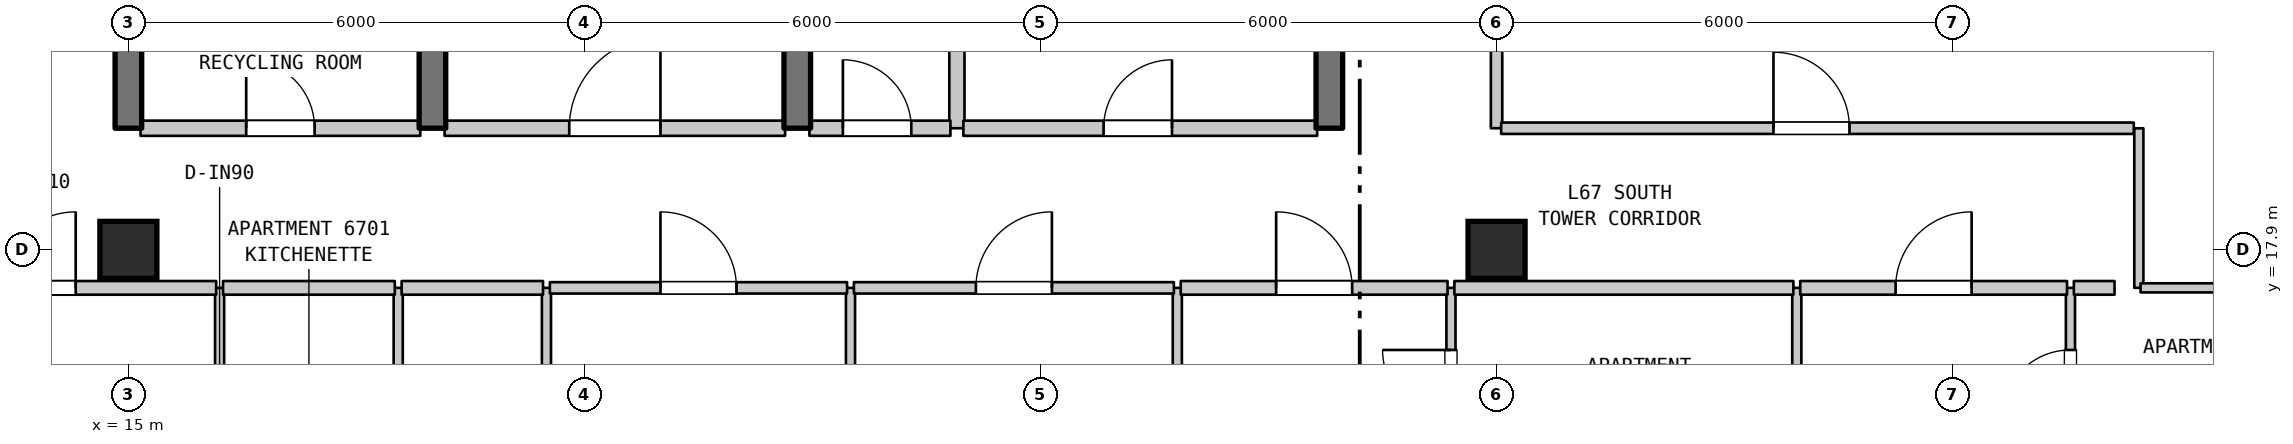
"""IFC4 building model, lengths in metres.
Left out: names, types, materials, properties, quantities, classifications, styles, units other than length and angle.
Written with IfcOpenShell. Run it as: python <this file> out.ifc"""

import sys

from ifc_helpers import new_model, si_unit, direction, frame, frame_2d, origin, origin_2d, place, context, subcontext, project, spatial, rectangle, extrude, element, fill, save


model = new_model("IFC4")
c1 = context("Model", 3, precision=1e-05, world=origin(), true_north=direction((0.0, 1.0)))
c2 = subcontext(c1, "Body", "Model", "MODEL_VIEW")
j1 = project(units=[si_unit("LENGTHUNIT", "METRE"), si_unit("PLANEANGLEUNIT", "RADIAN")], contexts=[c1])
p1 = place(None, origin())
s1 = spatial("IfcSite", under=j1, at=p1, CompositionType="ELEMENT")
p2 = place(p1, origin())
s2 = spatial("IfcBuilding", under=s1, at=p2, CompositionType="ELEMENT")
p3 = place(p2, frame((0.0, 0.0, 269.5)))
s3 = spatial("IfcBuildingStorey", under=s2, at=p3, CompositionType="ELEMENT", Elevation=269.5)
for number, where, z_axis, x_axis in (
    (1, (15.0, 17.9, 0.0), (0.0, 0.0, 1.0), (1.0, 0.0, 0.0)),
    (2, (33.0, 17.9, 0.0), (0.0, 0.0, 1.0), (1.0, 0.0, 0.0)),
):
    element("IfcColumn", number, at=place(p3, frame(where, z_axis=z_axis, x_axis=x_axis)), inside=s3, PredefinedType="COLUMN", context=c2, shape_type="SweptSolid", body=[
        extrude(rectangle(XDim=0.75, YDim=0.75, at=origin_2d()), origin(), (0.0, 0.0, 1.0), 3.7),
    ])
p4 = place(p3, frame((15.0, 19.5, 0.0), z_axis=(0.0, 0.0, 1.0), x_axis=(0.0, 1.0, 0.0)))
e3 = element("IfcWall", 3, at=p4, inside=s3, PredefinedType="SHEAR", context=c2, shape_type="SweptSolid", body=[
    extrude(rectangle(XDim=3.2, YDim=0.35, at=frame_2d((1.6, 0.0))), origin(), (0.0, 0.0, 1.0), 3.39),
])
p5 = place(p3, frame((16.2, 14.2, 0.0), z_axis=(0.0, 0.0, 1.0), x_axis=(0.0, 1.0, 0.0)))
e4 = element("IfcWall", 4, at=p5, inside=s3, PredefinedType="PARTITIONING", context=c2, shape_type="SweptSolid", body=[
    extrude(rectangle(XDim=3.2, YDim=0.12, at=frame_2d((1.6, 0.0))), origin(), (0.0, 0.0, 1.0), 3.39),
])
p6 = place(p5, frame((1.15, 0.0, 0.0)))
e5 = element("IfcOpeningElement", 5, at=p6, cuts=e4, PredefinedType="OPENING", context=c2, shape_type="SweptSolid", body=[
    extrude(rectangle(XDim=0.9, YDim=2.15, at=frame_2d((0.45, 1.075))), frame((0.0, 0.07, 0.0), z_axis=(0.0, -1.0, 0.0), x_axis=(1.0, 0.0, 0.0)), (0.0, 0.0, 1.0), 0.14),
])
p7 = place(p3, frame((18.55, 14.2, 0.0), z_axis=(0.0, 0.0, 1.0), x_axis=(0.0, 1.0, 0.0)))
e6 = element("IfcWall", 6, at=p7, inside=s3, PredefinedType="PARTITIONING", context=c2, shape_type="SweptSolid", body=[
    extrude(rectangle(XDim=3.2, YDim=0.12, at=frame_2d((1.6, 0.0))), origin(), (0.0, 0.0, 1.0), 3.39),
])
p8 = place(p3, frame((19.0, 19.5, 0.0), z_axis=(0.0, 0.0, 1.0), x_axis=(0.0, 1.0, 0.0)))
e7 = element("IfcWall", 7, at=p8, inside=s3, PredefinedType="SHEAR", context=c2, shape_type="SweptSolid", body=[
    extrude(rectangle(XDim=3.2, YDim=0.35, at=frame_2d((1.6, 0.0))), origin(), (0.0, 0.0, 1.0), 3.39),
])
p9 = place(p3, frame((20.5, 7.189, 0.0), z_axis=(0.0, 0.0, 1.0), x_axis=(0.0, 1.0, 0.0)))
e8 = element("IfcWall", 8, at=p9, inside=s3, PredefinedType="PARTITIONING", context=c2, shape_type="SweptSolid", body=[
    extrude(rectangle(XDim=10.211, YDim=0.12, at=frame_2d((5.105, 0.0))), origin(), (0.0, 0.0, 1.0), 3.39),
])
p10 = place(p3, frame((23.8, 19.5, 0.0), z_axis=(0.0, 0.0, 1.0), x_axis=(0.0, 1.0, 0.0)))
e9 = element("IfcWall", 9, at=p10, inside=s3, PredefinedType="SHEAR", context=c2, shape_type="SweptSolid", body=[
    extrude(rectangle(XDim=6.6, YDim=0.35, at=frame_2d((3.3, 0.0))), origin(), (0.0, 0.0, 1.0), 3.39),
])
p11 = place(p10, frame((4.304, 0.0, 0.0)))
e10 = element("IfcOpeningElement", 10, at=p11, cuts=e9, PredefinedType="OPENING", context=c2, shape_type="SweptSolid", body=[
    extrude(rectangle(XDim=0.9, YDim=2.15, at=frame_2d((0.45, 1.075))), frame((0.0, 0.185, 0.0), z_axis=(0.0, -1.0, 0.0), x_axis=(1.0, 0.0, 0.0)), (0.0, 0.0, 1.0), 0.37),
])
p12 = place(p3, frame((24.5, 6.71, 0.0), z_axis=(0.0, 0.0, 1.0), x_axis=(0.0, 1.0, 0.0)))
e11 = element("IfcWall", 11, at=p12, inside=s3, PredefinedType="PARTITIONING", context=c2, shape_type="SweptSolid", body=[
    extrude(rectangle(XDim=10.69, YDim=0.12, at=frame_2d((5.345, 0.0))), origin(), (0.0, 0.0, 1.0), 3.39),
])
p13 = place(p3, frame((25.9, 19.5, 0.0), z_axis=(0.0, 0.0, 1.0), x_axis=(0.0, 1.0, 0.0)))
e12 = element("IfcWall", 12, at=p13, inside=s3, PredefinedType="STANDARD", context=c2, shape_type="SweptSolid", body=[
    extrude(rectangle(XDim=3.2, YDim=0.2, at=frame_2d((1.6, 0.0))), origin(), (0.0, 0.0, 1.0), 3.39),
])
p14 = place(p3, frame((28.8, 6.71, 0.0), z_axis=(0.0, 0.0, 1.0), x_axis=(0.0, 1.0, 0.0)))
e13 = element("IfcWall", 13, at=p14, inside=s3, PredefinedType="PARTITIONING", context=c2, shape_type="SweptSolid", body=[
    extrude(rectangle(XDim=10.69, YDim=0.12, at=frame_2d((5.345, 0.0))), origin(), (0.0, 0.0, 1.0), 3.39),
])
p15 = place(p3, frame((30.8, 19.5, 0.0), z_axis=(0.0, 0.0, 1.0), x_axis=(0.0, 1.0, 0.0)))
e14 = element("IfcWall", 14, at=p15, inside=s3, PredefinedType="SHEAR", context=c2, shape_type="SweptSolid", body=[
    extrude(rectangle(XDim=3.2, YDim=0.35, at=frame_2d((1.6, 0.0))), origin(), (0.0, 0.0, 1.0), 3.39),
])
p16 = place(p3, frame((32.4, 15.008, 0.0), z_axis=(0.0, 0.0, 1.0), x_axis=(0.0, 1.0, 0.0)))
e15 = element("IfcWall", 15, at=p16, inside=s3, PredefinedType="PARTITIONING", context=c2, shape_type="SweptSolid", body=[
    extrude(rectangle(XDim=2.392, YDim=0.12, at=frame_2d((1.196, 0.0))), origin(), (0.0, 0.0, 1.0), 3.39),
])
p17 = place(p16, frame((0.675, 0.0, 0.0)))
e16 = element("IfcOpeningElement", 16, at=p17, cuts=e15, PredefinedType="OPENING", context=c2, shape_type="SweptSolid", body=[
    extrude(rectangle(XDim=0.9, YDim=2.1, at=frame_2d((0.45, 1.05))), frame((0.0, 0.07, 0.0), z_axis=(0.0, -1.0, 0.0), x_axis=(1.0, 0.0, 0.0)), (0.0, 0.0, 1.0), 0.14),
])
p18 = place(p3, frame((33.0, 19.5, 0.0), z_axis=(0.0, 0.0, 1.0), x_axis=(0.0, 1.0, 0.0)))
e17 = element("IfcWall", 17, at=p18, inside=s3, PredefinedType="STANDARD", context=c2, shape_type="SweptSolid", body=[
    extrude(rectangle(XDim=8.4, YDim=0.15, at=frame_2d((4.2, 0.0))), origin(), (0.0, 0.0, 1.0), 3.1),
])
p19 = place(p18, frame((5.18, 0.0, 0.0)))
e18 = element("IfcOpeningElement", 18, at=p19, cuts=e17, PredefinedType="OPENING", context=c2, shape_type="SweptSolid", body=[
    extrude(rectangle(XDim=1.0, YDim=2.15, at=frame_2d((0.5, 1.075))), frame((0.0, 0.085, 0.0), z_axis=(0.0, -1.0, 0.0), x_axis=(1.0, 0.0, 0.0)), (0.0, 0.0, 1.0), 0.17),
])
p20 = place(p3, frame((36.95, 15.008, 0.0), z_axis=(0.0, 0.0, 1.0), x_axis=(0.0, 1.0, 0.0)))
e19 = element("IfcWall", 19, at=p20, inside=s3, PredefinedType="PARTITIONING", context=c2, shape_type="SweptSolid", body=[
    extrude(rectangle(XDim=2.392, YDim=0.12, at=frame_2d((1.196, 0.0))), origin(), (0.0, 0.0, 1.0), 3.39),
])
p21 = place(p3, frame((40.55, 15.008, 0.0), z_axis=(0.0, 0.0, 1.0), x_axis=(0.0, 1.0, 0.0)))
e20 = element("IfcWall", 20, at=p21, inside=s3, PredefinedType="PARTITIONING", context=c2, shape_type="SweptSolid", body=[
    extrude(rectangle(XDim=2.392, YDim=0.12, at=frame_2d((1.196, 0.0))), origin(), (0.0, 0.0, 1.0), 3.39),
])
p22 = place(p21, frame((0.675, 0.0, 0.0)))
e21 = element("IfcOpeningElement", 21, at=p22, cuts=e20, PredefinedType="OPENING", context=c2, shape_type="SweptSolid", body=[
    extrude(rectangle(XDim=0.9, YDim=2.1, at=frame_2d((0.45, 1.05))), frame((0.0, 0.07, 0.0), z_axis=(0.0, -1.0, 0.0), x_axis=(1.0, 0.0, 0.0)), (0.0, 0.0, 1.0), 0.14),
])
p23 = place(p3, frame((41.45, 17.4, 0.0), z_axis=(0.0, 0.0, 1.0), x_axis=(0.0, 1.0, 0.0)))
e22 = element("IfcWall", 22, at=p23, inside=s3, PredefinedType="PARTITIONING", context=c2, shape_type="SweptSolid", body=[
    extrude(rectangle(XDim=2.099, YDim=0.12, at=frame_2d((1.05, 0.0))), origin(), (0.0, 0.0, 1.0), 3.39),
])
p24 = place(p3, frame((12.975, 17.4, 0.0), z_axis=(0.0, 0.0, 1.0), x_axis=(1.0, 0.0, 0.0)))
e23 = element("IfcWall", 23, at=p24, inside=s3, PredefinedType="STANDARD", context=c2, shape_type="SweptSolid", body=[
    extrude(rectangle(XDim=3.18, YDim=0.18, at=frame_2d((1.59, 0.0))), origin(), (0.0, 0.0, 1.0), 3.39),
])
p25 = place(p24, frame((0.332, 0.0, 0.0)))
e24 = element("IfcOpeningElement", 24, at=p25, cuts=e23, PredefinedType="OPENING", context=c2, shape_type="SweptSolid", body=[
    extrude(rectangle(XDim=1.0, YDim=2.15, at=frame_2d((0.5, 1.075))), frame((0.0, 0.1, 0.0), z_axis=(0.0, -1.0, 0.0), x_axis=(1.0, 0.0, 0.0)), (0.0, 0.0, 1.0), 0.2),
])
p26 = place(p3, frame((16.245, 17.4, 0.0), z_axis=(0.0, 0.0, 1.0), x_axis=(1.0, 0.0, 0.0)))
e25 = element("IfcWall", 25, at=p26, inside=s3, PredefinedType="STANDARD", context=c2, shape_type="SweptSolid", body=[
    extrude(rectangle(XDim=2.26, YDim=0.18, at=frame_2d((1.13, 0.0))), origin(), (0.0, 0.0, 1.0), 3.39),
])
p27 = place(p3, frame((18.595, 17.4, 0.0), z_axis=(0.0, 0.0, 1.0), x_axis=(1.0, 0.0, 0.0)))
e26 = element("IfcWall", 26, at=p27, inside=s3, PredefinedType="STANDARD", context=c2, shape_type="SweptSolid", body=[
    extrude(rectangle(XDim=1.86, YDim=0.18, at=frame_2d((0.93, 0.0))), origin(), (0.0, 0.0, 1.0), 3.39),
])
p28 = place(p3, frame((20.545, 17.4, 0.0), z_axis=(0.0, 0.0, 1.0), x_axis=(1.0, 0.0, 0.0)))
e27 = element("IfcWall", 27, at=p28, inside=s3, PredefinedType="STANDARD", context=c2, shape_type="SweptSolid", body=[
    extrude(rectangle(XDim=3.91, YDim=0.15, at=frame_2d((1.955, 0.0))), origin(), (0.0, 0.0, 1.0), 3.39),
])
p29 = place(p28, frame((1.455, 0.0, 0.0)))
e28 = element("IfcOpeningElement", 28, at=p29, cuts=e27, PredefinedType="OPENING", context=c2, shape_type="SweptSolid", body=[
    extrude(rectangle(XDim=1.0, YDim=2.15, at=frame_2d((0.5, 1.075))), frame((0.0, 0.085, 0.0), z_axis=(0.0, -1.0, 0.0), x_axis=(1.0, 0.0, 0.0)), (0.0, 0.0, 1.0), 0.17),
])
p30 = place(p3, frame((24.545, 17.4, 0.0), z_axis=(0.0, 0.0, 1.0), x_axis=(1.0, 0.0, 0.0)))
e29 = element("IfcWall", 29, at=p30, inside=s3, PredefinedType="STANDARD", context=c2, shape_type="SweptSolid", body=[
    extrude(rectangle(XDim=4.21, YDim=0.15, at=frame_2d((2.105, 0.0))), origin(), (0.0, 0.0, 1.0), 3.39),
])
p31 = place(p30, frame((1.605, 0.0, 0.0)))
e30 = element("IfcOpeningElement", 30, at=p31, cuts=e29, PredefinedType="OPENING", context=c2, shape_type="SweptSolid", body=[
    extrude(rectangle(XDim=1.0, YDim=2.15, at=frame_2d((0.5, 1.075))), frame((0.0, 0.085, 0.0), z_axis=(0.0, -1.0, 0.0), x_axis=(1.0, 0.0, 0.0)), (0.0, 0.0, 1.0), 0.17),
])
p32 = place(p3, frame((28.845, 17.4, 0.0), z_axis=(0.0, 0.0, 1.0), x_axis=(1.0, 0.0, 0.0)))
e31 = element("IfcWall", 31, at=p32, inside=s3, PredefinedType="STANDARD", context=c2, shape_type="SweptSolid", body=[
    extrude(rectangle(XDim=3.51, YDim=0.18, at=frame_2d((1.755, 0.0))), origin(), (0.0, 0.0, 1.0), 3.39),
])
p33 = place(p32, frame((1.255, 0.0, 0.0)))
e32 = element("IfcOpeningElement", 32, at=p33, cuts=e31, PredefinedType="OPENING", context=c2, shape_type="SweptSolid", body=[
    extrude(rectangle(XDim=1.0, YDim=2.15, at=frame_2d((0.5, 1.075))), frame((0.0, 0.1, 0.0), z_axis=(0.0, -1.0, 0.0), x_axis=(1.0, 0.0, 0.0)), (0.0, 0.0, 1.0), 0.2),
])
p34 = place(p3, frame((32.445, 17.4, 0.0), z_axis=(0.0, 0.0, 1.0), x_axis=(1.0, 0.0, 0.0)))
e33 = element("IfcWall", 33, at=p34, inside=s3, PredefinedType="STANDARD", context=c2, shape_type="SweptSolid", body=[
    extrude(rectangle(XDim=4.46, YDim=0.18, at=frame_2d((2.23, 0.0))), origin(), (0.0, 0.0, 1.0), 3.39),
])
p35 = place(p3, frame((36.995, 17.4, 0.0), z_axis=(0.0, 0.0, 1.0), x_axis=(1.0, 0.0, 0.0)))
e34 = element("IfcWall", 34, at=p35, inside=s3, PredefinedType="STANDARD", context=c2, shape_type="SweptSolid", body=[
    extrude(rectangle(XDim=3.51, YDim=0.18, at=frame_2d((1.755, 0.0))), origin(), (0.0, 0.0, 1.0), 3.39),
])
p36 = place(p35, frame((1.255, 0.0, 0.0)))
e35 = element("IfcOpeningElement", 35, at=p36, cuts=e34, PredefinedType="OPENING", context=c2, shape_type="SweptSolid", body=[
    extrude(rectangle(XDim=1.0, YDim=2.15, at=frame_2d((0.5, 1.075))), frame((0.0, 0.1, 0.0), z_axis=(0.0, -1.0, 0.0), x_axis=(1.0, 0.0, 0.0)), (0.0, 0.0, 1.0), 0.2),
])
p37 = place(p3, frame((40.595, 17.4, 0.0), z_axis=(0.0, 0.0, 1.0), x_axis=(1.0, 0.0, 0.0)))
e36 = element("IfcWall", 36, at=p37, inside=s3, PredefinedType="STANDARD", context=c2, shape_type="SweptSolid", body=[
    extrude(rectangle(XDim=0.535, YDim=0.18, at=frame_2d((0.268, 0.0))), origin(), (0.0, 0.0, 1.0), 3.39),
])
p38 = place(p3, frame((41.473, 17.4, 0.0), z_axis=(0.0, 0.0, 1.0), x_axis=(1.0, 0.0, 0.0)))
e37 = element("IfcWall", 37, at=p38, inside=s3, PredefinedType="PARTITIONING", context=c2, shape_type="SweptSolid", body=[
    extrude(rectangle(XDim=2.031, YDim=0.12, at=frame_2d((1.016, 0.0))), origin(), (0.0, 0.0, 1.0), 3.39),
])
p39 = place(p3, frame((15.16, 19.5, 0.0), z_axis=(0.0, 0.0, 1.0), x_axis=(1.0, 0.0, 0.0)))
e38 = element("IfcWall", 38, at=p39, inside=s3, PredefinedType="STANDARD", context=c2, shape_type="SweptSolid", body=[
    extrude(rectangle(XDim=3.68, YDim=0.2, at=frame_2d((1.84, 0.0))), origin(), (0.0, 0.0, 1.0), 3.39),
])
p40 = place(p39, frame((1.39, 0.0, 0.0)))
e39 = element("IfcOpeningElement", 39, at=p40, cuts=e38, PredefinedType="OPENING", context=c2, shape_type="SweptSolid", body=[
    extrude(rectangle(XDim=0.9, YDim=2.15, at=frame_2d((0.45, 1.075))), frame((0.0, 0.11, 0.0), z_axis=(0.0, -1.0, 0.0), x_axis=(1.0, 0.0, 0.0)), (0.0, 0.0, 1.0), 0.22),
])
p41 = place(p3, frame((19.16, 19.5, 0.0), z_axis=(0.0, 0.0, 1.0), x_axis=(1.0, 0.0, 0.0)))
e40 = element("IfcWall", 40, at=p41, inside=s3, PredefinedType="STANDARD", context=c2, shape_type="SweptSolid", body=[
    extrude(rectangle(XDim=4.48, YDim=0.2, at=frame_2d((2.24, 0.0))), origin(), (0.0, 0.0, 1.0), 3.39),
])
p42 = place(p41, frame((1.64, 0.0, 0.0)))
e41 = element("IfcOpeningElement", 41, at=p42, cuts=e40, PredefinedType="OPENING", context=c2, shape_type="SweptSolid", body=[
    extrude(rectangle(XDim=1.2, YDim=2.2, at=frame_2d((0.6, 1.1))), frame((0.0, 0.11, 0.0), z_axis=(0.0, -1.0, 0.0), x_axis=(1.0, 0.0, 0.0)), (0.0, 0.0, 1.0), 0.22),
])
p43 = place(p3, frame((23.96, 19.5, 0.0), z_axis=(0.0, 0.0, 1.0), x_axis=(1.0, 0.0, 0.0)))
e42 = element("IfcWall", 42, at=p43, inside=s3, PredefinedType="STANDARD", context=c2, shape_type="SweptSolid", body=[
    extrude(rectangle(XDim=1.855, YDim=0.2, at=frame_2d((0.927, 0.0))), origin(), (0.0, 0.0, 1.0), 3.39),
])
p44 = place(p43, frame((0.44, 0.0, 0.0)))
e43 = element("IfcOpeningElement", 43, at=p44, cuts=e42, PredefinedType="OPENING", context=c2, shape_type="SweptSolid", body=[
    extrude(rectangle(XDim=0.9, YDim=2.15, at=frame_2d((0.45, 1.075))), frame((0.0, 0.11, 0.0), z_axis=(0.0, -1.0, 0.0), x_axis=(1.0, 0.0, 0.0)), (0.0, 0.0, 1.0), 0.22),
])
p45 = place(p3, frame((25.985, 19.5, 0.0), z_axis=(0.0, 0.0, 1.0), x_axis=(1.0, 0.0, 0.0)))
e44 = element("IfcWall", 44, at=p45, inside=s3, PredefinedType="STANDARD", context=c2, shape_type="SweptSolid", body=[
    extrude(rectangle(XDim=4.655, YDim=0.2, at=frame_2d((2.327, 0.0))), origin(), (0.0, 0.0, 1.0), 3.39),
])
p46 = place(p45, frame((1.845, 0.0, 0.0)))
e45 = element("IfcOpeningElement", 45, at=p46, cuts=e44, PredefinedType="OPENING", context=c2, shape_type="SweptSolid", body=[
    extrude(rectangle(XDim=0.9, YDim=2.15, at=frame_2d((0.45, 1.075))), frame((0.0, 0.11, 0.0), z_axis=(0.0, -1.0, 0.0), x_axis=(1.0, 0.0, 0.0)), (0.0, 0.0, 1.0), 0.22),
])
p47 = place(p3, frame((33.06, 19.5, 0.0), z_axis=(0.0, 0.0, 1.0), x_axis=(1.0, 0.0, 0.0)))
e46 = element("IfcWall", 46, at=p47, inside=s3, PredefinedType="STANDARD", context=c2, shape_type="SweptSolid", body=[
    extrude(rectangle(XDim=8.323, YDim=0.15, at=frame_2d((4.162, 0.0))), origin(), (0.0, 0.0, 1.0), 3.39),
])
p48 = place(p47, frame((3.583, 0.0, 0.0)))
e47 = element("IfcOpeningElement", 47, at=p48, cuts=e46, PredefinedType="OPENING", context=c2, shape_type="SweptSolid", body=[
    extrude(rectangle(XDim=1.0, YDim=2.15, at=frame_2d((0.5, 1.075))), frame((0.0, 0.085, 0.0), z_axis=(0.0, -1.0, 0.0), x_axis=(1.0, 0.0, 0.0)), (0.0, 0.0, 1.0), 0.17),
])
p49 = place(p17, origin())
e48 = element("IfcDoor", 48, at=p49, inside=s3, OperationType="SINGLE_SWING_RIGHT", PredefinedType="DOOR", context=c2, shape_type="SweptSolid", body=[
    extrude(rectangle(XDim=0.9, YDim=2.1, at=frame_2d((0.45, 1.05))), frame((0.0, 0.025, 0.0), z_axis=(0.0, -1.0, 0.0), x_axis=(1.0, 0.0, 0.0)), (0.0, 0.0, 1.0), 0.05),
])
fill(e16, e48)
p50 = place(p22, origin())
e49 = element("IfcDoor", 49, at=p50, inside=s3, OperationType="SINGLE_SWING_LEFT", PredefinedType="DOOR", context=c2, shape_type="SweptSolid", body=[
    extrude(rectangle(XDim=0.9, YDim=2.1, at=frame_2d((0.45, 1.05))), frame((0.0, 0.025, 0.0), z_axis=(0.0, -1.0, 0.0), x_axis=(1.0, 0.0, 0.0)), (0.0, 0.0, 1.0), 0.05),
])
fill(e21, e49)
p51 = place(p25, origin())
e50 = element("IfcDoor", 50, at=p51, inside=s3, OperationType="SINGLE_SWING_RIGHT", PredefinedType="DOOR", context=c2, shape_type="SweptSolid", body=[
    extrude(rectangle(XDim=1.0, YDim=2.15, at=frame_2d((0.5, 1.075))), frame((0.0, 0.025, 0.0), z_axis=(0.0, -1.0, 0.0), x_axis=(1.0, 0.0, 0.0)), (0.0, 0.0, 1.0), 0.05),
])
fill(e24, e50)
p52 = place(p29, origin())
e51 = element("IfcDoor", 51, at=p52, inside=s3, OperationType="SINGLE_SWING_LEFT", PredefinedType="DOOR", context=c2, shape_type="SweptSolid", body=[
    extrude(rectangle(XDim=1.0, YDim=2.15, at=frame_2d((0.5, 1.075))), frame((0.0, 0.025, 0.0), z_axis=(0.0, -1.0, 0.0), x_axis=(1.0, 0.0, 0.0)), (0.0, 0.0, 1.0), 0.05),
])
fill(e28, e51)
p53 = place(p31, origin())
e52 = element("IfcDoor", 52, at=p53, inside=s3, OperationType="SINGLE_SWING_RIGHT", PredefinedType="DOOR", context=c2, shape_type="SweptSolid", body=[
    extrude(rectangle(XDim=1.0, YDim=2.15, at=frame_2d((0.5, 1.075))), frame((0.0, 0.025, 0.0), z_axis=(0.0, -1.0, 0.0), x_axis=(1.0, 0.0, 0.0)), (0.0, 0.0, 1.0), 0.05),
])
fill(e30, e52)
p54 = place(p33, origin())
e53 = element("IfcDoor", 53, at=p54, inside=s3, OperationType="SINGLE_SWING_LEFT", PredefinedType="DOOR", context=c2, shape_type="SweptSolid", body=[
    extrude(rectangle(XDim=1.0, YDim=2.15, at=frame_2d((0.5, 1.075))), frame((0.0, 0.025, 0.0), z_axis=(0.0, -1.0, 0.0), x_axis=(1.0, 0.0, 0.0)), (0.0, 0.0, 1.0), 0.05),
])
fill(e32, e53)
p55 = place(p36, origin())
e54 = element("IfcDoor", 54, at=p55, inside=s3, OperationType="SINGLE_SWING_RIGHT", PredefinedType="DOOR", context=c2, shape_type="SweptSolid", body=[
    extrude(rectangle(XDim=1.0, YDim=2.15, at=frame_2d((0.5, 1.075))), frame((0.0, 0.025, 0.0), z_axis=(0.0, -1.0, 0.0), x_axis=(1.0, 0.0, 0.0)), (0.0, 0.0, 1.0), 0.05),
])
fill(e35, e54)
p56 = place(p40, origin())
e55 = element("IfcDoor", 55, at=p56, inside=s3, OperationType="SINGLE_SWING_LEFT", PredefinedType="DOOR", context=c2, shape_type="SweptSolid", body=[
    extrude(rectangle(XDim=0.9, YDim=2.15, at=frame_2d((0.45, 1.075))), frame((0.0, 0.025, 0.0), z_axis=(0.0, -1.0, 0.0), x_axis=(1.0, 0.0, 0.0)), (0.0, 0.0, 1.0), 0.05),
])
fill(e39, e55)
p57 = place(p42, origin())
e56 = element("IfcDoor", 56, at=p57, inside=s3, OperationType="SINGLE_SWING_RIGHT", PredefinedType="DOOR", context=c2, shape_type="SweptSolid", body=[
    extrude(rectangle(XDim=1.2, YDim=2.2, at=frame_2d((0.6, 1.1))), frame((0.0, 0.025, 0.0), z_axis=(0.0, -1.0, 0.0), x_axis=(1.0, 0.0, 0.0)), (0.0, 0.0, 1.0), 0.05),
])
fill(e41, e56)
p58 = place(p44, origin())
e57 = element("IfcDoor", 57, at=p58, inside=s3, OperationType="SINGLE_SWING_LEFT", PredefinedType="DOOR", context=c2, shape_type="SweptSolid", body=[
    extrude(rectangle(XDim=0.9, YDim=2.15, at=frame_2d((0.45, 1.075))), frame((0.0, 0.025, 0.0), z_axis=(0.0, -1.0, 0.0), x_axis=(1.0, 0.0, 0.0)), (0.0, 0.0, 1.0), 0.05),
])
fill(e43, e57)
p59 = place(p46, origin())
e58 = element("IfcDoor", 58, at=p59, inside=s3, OperationType="SINGLE_SWING_RIGHT", PredefinedType="DOOR", context=c2, shape_type="SweptSolid", body=[
    extrude(rectangle(XDim=0.9, YDim=2.15, at=frame_2d((0.45, 1.075))), frame((0.0, 0.025, 0.0), z_axis=(0.0, -1.0, 0.0), x_axis=(1.0, 0.0, 0.0)), (0.0, 0.0, 1.0), 0.05),
])
fill(e45, e58)
p60 = place(p48, origin())
e59 = element("IfcDoor", 59, at=p60, inside=s3, OperationType="SINGLE_SWING_LEFT", PredefinedType="DOOR", context=c2, shape_type="SweptSolid", body=[
    extrude(rectangle(XDim=1.0, YDim=2.15, at=frame_2d((0.5, 1.075))), frame((0.0, 0.025, 0.0), z_axis=(0.0, -1.0, 0.0), x_axis=(1.0, 0.0, 0.0)), (0.0, 0.0, 1.0), 0.05),
])
fill(e47, e59)
save(model, sys.argv[1])
